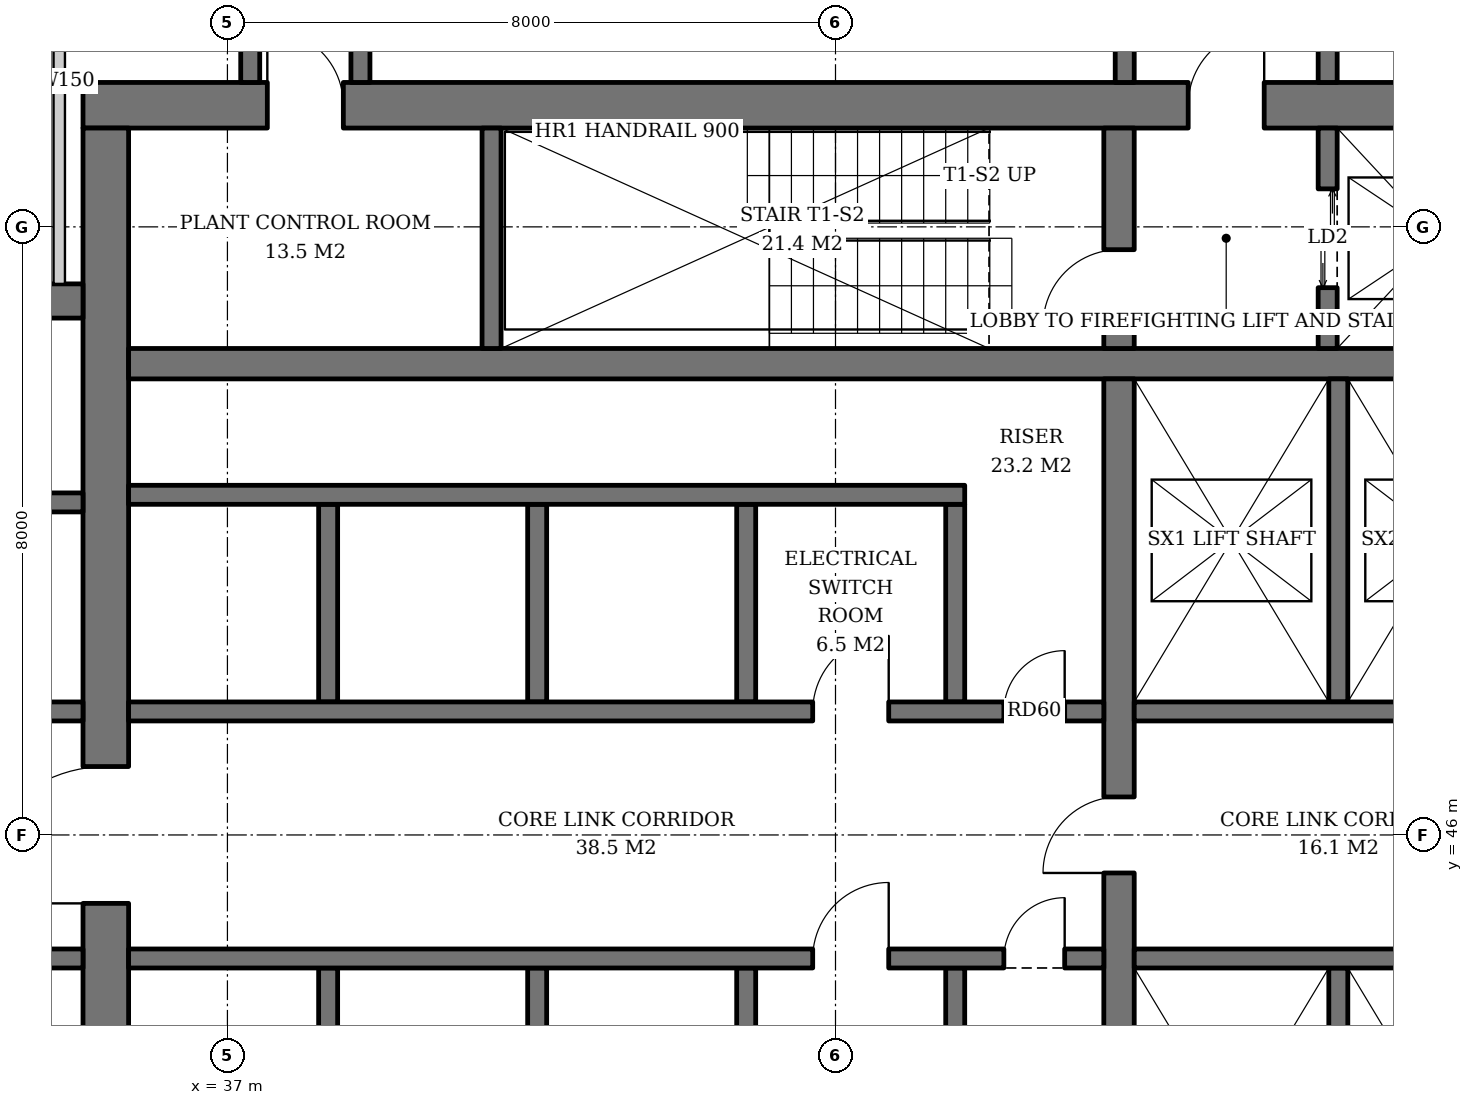
"""IFC4 building model, lengths in metres.
Left out: names, types, materials, properties, quantities, classifications, styles, units other than length and angle.
Written with IfcOpenShell. Run it as: python <this file> out.ifc"""

import sys

from ifc_helpers import new_model, si_unit, direction, frame, frame_2d, origin, place, context, subcontext, project, spatial, rectangle, extrude, element, fill, save


model = new_model("IFC4")
c1 = context("Model", 3, precision=1e-05, world=origin(), true_north=direction((0.0, 1.0)))
c2 = subcontext(c1, "Body", "Model", "MODEL_VIEW")
j1 = project(units=[si_unit("LENGTHUNIT", "METRE"), si_unit("PLANEANGLEUNIT", "RADIAN")], contexts=[c1])
p1 = place(None, origin())
s1 = spatial("IfcSite", under=j1, at=p1, CompositionType="ELEMENT")
p2 = place(p1, origin())
s2 = spatial("IfcBuilding", under=s1, at=p2, CompositionType="ELEMENT")
p3 = place(p2, frame((0.0, 0.0, 161.6)))
s3 = spatial("IfcBuildingStorey", under=s2, at=p3, CompositionType="ELEMENT", Elevation=161.6)
p4 = place(p3, frame((35.1, 55.6, 0.0), z_axis=(0.0, 0.0, 1.0), x_axis=(1.0, 0.0, 0.0)))
e1 = element("IfcWall", 1, at=p4, inside=s3, PredefinedType="SHEAR", context=c2, shape_type="SweptSolid", body=[
    extrude(rectangle(XDim=19.8, YDim=0.6, at=frame_2d((9.9, 0.0))), origin(), (0.0, 0.0, 1.0), 3.8),
])
p5 = place(p4, frame((14.54, 0.0, 0.0)))
e2 = element("IfcOpeningElement", 2, at=p5, cuts=e1, PredefinedType="OPENING", context=c2, shape_type="SweptSolid", body=[
    extrude(rectangle(XDim=1.0, YDim=2.1, at=frame_2d((0.5, 1.05))), frame((0.0, 0.31, 0.0), z_axis=(0.0, -1.0, 0.0), x_axis=(1.0, 0.0, 0.0)), (0.0, 0.0, 1.0), 0.62),
])
p6 = place(p4, frame((2.425, 0.0, 0.0)))
e3 = element("IfcOpeningElement", 3, at=p6, cuts=e1, PredefinedType="OPENING", context=c2, shape_type="SweptSolid", body=[
    extrude(rectangle(XDim=1.0, YDim=2.1, at=frame_2d((0.5, 1.05))), frame((0.0, 0.31, 0.0), z_axis=(0.0, -1.0, 0.0), x_axis=(1.0, 0.0, 0.0)), (0.0, 0.0, 1.0), 0.62),
])
p7 = place(p3, frame((35.4, 36.7, 0.0), z_axis=(0.0, 0.0, 1.0), x_axis=(0.0, 1.0, 0.0)))
e4 = element("IfcWall", 4, at=p7, inside=s3, PredefinedType="SHEAR", context=c2, shape_type="SweptSolid", body=[
    extrude(rectangle(XDim=18.6, YDim=0.6, at=frame_2d((9.3, 0.0))), origin(), (0.0, 0.0, 1.0), 3.8),
])
p8 = place(p7, frame((8.4, 0.0, 0.0)))
e5 = element("IfcOpeningElement", 5, at=p8, cuts=e4, PredefinedType="OPENING", context=c2, shape_type="SweptSolid", body=[
    extrude(rectangle(XDim=1.8, YDim=2.4, at=frame_2d((0.9, 1.2))), frame((0.0, 0.31, 0.0), z_axis=(0.0, -1.0, 0.0), x_axis=(1.0, 0.0, 0.0)), (0.0, 0.0, 1.0), 0.62),
])
p9 = place(p3, frame((35.7, 52.2, 0.0), z_axis=(0.0, 0.0, 1.0), x_axis=(1.0, 0.0, 0.0)))
e6 = element("IfcWall", 6, at=p9, inside=s3, PredefinedType="SHEAR", context=c2, shape_type="SweptSolid", body=[
    extrude(rectangle(XDim=18.6, YDim=0.4, at=frame_2d((9.3, 0.0))), origin(), (0.0, 0.0, 1.0), 3.8),
])
p10 = place(p3, frame((48.73, 40.0, 0.0), z_axis=(0.0, 0.0, 1.0), x_axis=(0.0, 1.0, 0.0)))
e7 = element("IfcWall", 7, at=p10, inside=s3, PredefinedType="SHEAR", context=c2, shape_type="SweptSolid", body=[
    extrude(rectangle(XDim=12.0, YDim=0.4, at=frame_2d((6.0, 0.0))), origin(), (0.0, 0.0, 1.0), 3.8),
])
p11 = place(p10, frame((5.5, 0.0, 0.0)))
e8 = element("IfcOpeningElement", 8, at=p11, cuts=e7, PredefinedType="OPENING", context=c2, shape_type="SweptSolid", body=[
    extrude(rectangle(XDim=1.0, YDim=2.1, at=frame_2d((0.5, 1.05))), frame((0.0, 0.21, 0.0), z_axis=(0.0, -1.0, 0.0), x_axis=(1.0, 0.0, 0.0)), (0.0, 0.0, 1.0), 0.42),
])
p12 = place(p3, frame((48.73, 52.4, 0.0), z_axis=(0.0, 0.0, 1.0), x_axis=(0.0, 1.0, 0.0)))
e9 = element("IfcWall", 9, at=p12, inside=s3, PredefinedType="SHEAR", context=c2, shape_type="SweptSolid", body=[
    extrude(rectangle(XDim=2.9, YDim=0.4, at=frame_2d((1.45, 0.0))), origin(), (0.0, 0.0, 1.0), 3.8),
])
p13 = place(p12, frame((0.3, 0.0, 0.0)))
e10 = element("IfcOpeningElement", 10, at=p13, cuts=e9, PredefinedType="OPENING", context=c2, shape_type="SweptSolid", body=[
    extrude(rectangle(XDim=1.0, YDim=2.1, at=frame_2d((0.5, 1.05))), frame((0.0, 0.21, 0.0), z_axis=(0.0, -1.0, 0.0), x_axis=(1.0, 0.0, 0.0)), (0.0, 0.0, 1.0), 0.42),
])
p14 = place(p3, frame((40.475, 52.4, 0.0), z_axis=(0.0, 0.0, 1.0), x_axis=(0.0, 1.0, 0.0)))
e11 = element("IfcWall", 11, at=p14, inside=s3, PredefinedType="SHEAR", context=c2, shape_type="SweptSolid", body=[
    extrude(rectangle(XDim=2.9, YDim=0.25, at=frame_2d((1.45, 0.0))), origin(), (0.0, 0.0, 1.0), 3.8),
])
p15 = place(p3, frame((51.475, 52.4, 0.0), z_axis=(0.0, 0.0, 1.0), x_axis=(0.0, 1.0, 0.0)))
e12 = element("IfcWall", 12, at=p15, inside=s3, PredefinedType="SHEAR", context=c2, shape_type="SweptSolid", body=[
    extrude(rectangle(XDim=2.9, YDim=0.25, at=frame_2d((1.45, 0.0))), origin(), (0.0, 0.0, 1.0), 3.8),
])
p16 = place(p15, frame((0.8, 0.0, 0.0)))
e13 = element("IfcOpeningElement", 13, at=p16, cuts=e12, PredefinedType="OPENING", context=c2, shape_type="SweptSolid", body=[
    extrude(rectangle(XDim=1.3, YDim=2.2, at=frame_2d((0.65, 1.1))), frame((0.0, 0.135, 0.0), z_axis=(0.0, -1.0, 0.0), x_axis=(1.0, 0.0, 0.0)), (0.0, 0.0, 1.0), 0.27),
])
for number, where, z_axis, x_axis in (
    (14, (38.325, 47.75, 0.0), (0.0, 0.0, 1.0), (0.0, 1.0, 0.0)),
    (15, (41.075, 47.75, 0.0), (0.0, 0.0, 1.0), (0.0, 1.0, 0.0)),
    (16, (43.825, 47.75, 0.0), (0.0, 0.0, 1.0), (0.0, 1.0, 0.0)),
    (17, (46.575, 47.75, 0.0), (0.0, 0.0, 1.0), (0.0, 1.0, 0.0)),
):
    element("IfcWall", number, at=place(p3, frame(where, z_axis=z_axis, x_axis=x_axis)), inside=s3, PredefinedType="SHEAR", context=c2, shape_type="SweptSolid", body=[
        extrude(rectangle(XDim=2.6, YDim=0.25, at=frame_2d((1.3, 0.0))), origin(), (0.0, 0.0, 1.0), 3.8),
    ])
p17 = place(p3, frame((35.7, 50.475, 0.0), z_axis=(0.0, 0.0, 1.0), x_axis=(1.0, 0.0, 0.0)))
e18 = element("IfcWall", 18, at=p17, inside=s3, PredefinedType="SHEAR", context=c2, shape_type="SweptSolid", body=[
    extrude(rectangle(XDim=11.0, YDim=0.25, at=frame_2d((5.5, 0.0))), origin(), (0.0, 0.0, 1.0), 3.8),
])
p18 = place(p3, frame((35.7, 47.625, 0.0), z_axis=(0.0, 0.0, 1.0), x_axis=(1.0, 0.0, 0.0)))
e19 = element("IfcWall", 19, at=p18, inside=s3, PredefinedType="SHEAR", context=c2, shape_type="SweptSolid", body=[
    extrude(rectangle(XDim=12.83, YDim=0.25, at=frame_2d((6.415, 0.0))), origin(), (0.0, 0.0, 1.0), 3.8),
])
p19 = place(p18, frame((9.0, 0.0, 0.0)))
e20 = element("IfcOpeningElement", 20, at=p19, cuts=e19, PredefinedType="OPENING", context=c2, shape_type="SweptSolid", body=[
    extrude(rectangle(XDim=1.0, YDim=2.1, at=frame_2d((0.5, 1.05))), frame((0.0, 0.135, 0.0), z_axis=(0.0, -1.0, 0.0), x_axis=(1.0, 0.0, 0.0)), (0.0, 0.0, 1.0), 0.27),
])
p20 = place(p18, frame((11.515, 0.0, 0.0)))
e21 = element("IfcOpeningElement", 21, at=p20, cuts=e19, PredefinedType="OPENING", context=c2, shape_type="SweptSolid", body=[
    extrude(rectangle(XDim=0.8, YDim=2.0, at=frame_2d((0.4, 1.0))), frame((0.0, 0.135, 0.0), z_axis=(0.0, -1.0, 0.0), x_axis=(1.0, 0.0, 0.0)), (0.0, 0.0, 1.0), 0.27),
])
for number, where, z_axis, x_axis in (
    (22, (38.325, 44.25, 0.0), (0.0, 0.0, 1.0), (0.0, -1.0, 0.0)),
    (23, (41.075, 44.25, 0.0), (0.0, 0.0, 1.0), (0.0, -1.0, 0.0)),
    (24, (43.825, 44.25, 0.0), (0.0, 0.0, 1.0), (0.0, -1.0, 0.0)),
    (25, (46.575, 44.25, 0.0), (0.0, 0.0, 1.0), (0.0, -1.0, 0.0)),
):
    element("IfcWall", number, at=place(p3, frame(where, z_axis=z_axis, x_axis=x_axis)), inside=s3, PredefinedType="SHEAR", context=c2, shape_type="SweptSolid", body=[
        extrude(rectangle(XDim=2.6, YDim=0.25, at=frame_2d((1.3, 0.0))), origin(), (0.0, 0.0, 1.0), 3.8),
    ])
p21 = place(p3, frame((35.7, 44.375, 0.0), z_axis=(0.0, 0.0, 1.0), x_axis=(1.0, 0.0, 0.0)))
e26 = element("IfcWall", 26, at=p21, inside=s3, PredefinedType="SHEAR", context=c2, shape_type="SweptSolid", body=[
    extrude(rectangle(XDim=12.83, YDim=0.25, at=frame_2d((6.415, 0.0))), origin(), (0.0, 0.0, 1.0), 3.8),
])
p22 = place(p21, frame((9.0, 0.0, 0.0)))
e27 = element("IfcOpeningElement", 27, at=p22, cuts=e26, PredefinedType="OPENING", context=c2, shape_type="SweptSolid", body=[
    extrude(rectangle(XDim=1.0, YDim=2.1, at=frame_2d((0.5, 1.05))), frame((0.0, 0.135, 0.0), z_axis=(0.0, -1.0, 0.0), x_axis=(1.0, 0.0, 0.0)), (0.0, 0.0, 1.0), 0.27),
])
p23 = place(p21, frame((11.515, 0.0, 0.0)))
e28 = element("IfcOpeningElement", 28, at=p23, cuts=e26, PredefinedType="OPENING", context=c2, shape_type="SweptSolid", body=[
    extrude(rectangle(XDim=0.8, YDim=2.0, at=frame_2d((0.4, 1.0))), frame((0.0, 0.135, 0.0), z_axis=(0.0, -1.0, 0.0), x_axis=(1.0, 0.0, 0.0)), (0.0, 0.0, 1.0), 0.27),
])
p24 = place(p3, frame((51.615, 47.75, 0.0), z_axis=(0.0, 0.0, 1.0), x_axis=(0.0, 1.0, 0.0)))
e29 = element("IfcWall", 29, at=p24, inside=s3, PredefinedType="SHEAR", context=c2, shape_type="SweptSolid", body=[
    extrude(rectangle(XDim=4.25, YDim=0.25, at=frame_2d((2.125, 0.0))), origin(), (0.0, 0.0, 1.0), 3.8),
])
p25 = place(p3, frame((48.93, 47.625, 0.0), z_axis=(0.0, 0.0, 1.0), x_axis=(1.0, 0.0, 0.0)))
e30 = element("IfcWall", 30, at=p25, inside=s3, PredefinedType="SHEAR", context=c2, shape_type="SweptSolid", body=[
    extrude(rectangle(XDim=5.37, YDim=0.25, at=frame_2d((2.685, 0.0))), origin(), (0.0, 0.0, 1.0), 3.8),
])
p26 = place(p3, frame((51.615, 44.25, 0.0), z_axis=(0.0, 0.0, 1.0), x_axis=(0.0, -1.0, 0.0)))
e31 = element("IfcWall", 31, at=p26, inside=s3, PredefinedType="SHEAR", context=c2, shape_type="SweptSolid", body=[
    extrude(rectangle(XDim=4.25, YDim=0.25, at=frame_2d((2.125, 0.0))), origin(), (0.0, 0.0, 1.0), 3.8),
])
p27 = place(p3, frame((48.93, 44.375, 0.0), z_axis=(0.0, 0.0, 1.0), x_axis=(1.0, 0.0, 0.0)))
e32 = element("IfcWall", 32, at=p27, inside=s3, PredefinedType="SHEAR", context=c2, shape_type="SweptSolid", body=[
    extrude(rectangle(XDim=5.37, YDim=0.25, at=frame_2d((2.685, 0.0))), origin(), (0.0, 0.0, 1.0), 3.8),
])
for number, where, z_axis, x_axis in (
    (33, (32.4, 44.375, 0.0), (0.0, 0.0, 1.0), (1.0, 0.0, 0.0)),
    (34, (32.4, 47.625, 0.0), (0.0, 0.0, 1.0), (1.0, 0.0, 0.0)),
    (35, (32.4, 50.375, 0.0), (0.0, 0.0, 1.0), (1.0, 0.0, 0.0)),
):
    element("IfcWall", number, at=place(p3, frame(where, z_axis=z_axis, x_axis=x_axis)), inside=s3, PredefinedType="SHEAR", context=c2, shape_type="SweptSolid", body=[
        extrude(rectangle(XDim=2.7, YDim=0.25, at=frame_2d((1.35, 0.0))), origin(), (0.0, 0.0, 1.0), 3.8),
    ])
p28 = place(p3, frame((32.4, 53.025, 0.0), z_axis=(0.0, 0.0, 1.0), x_axis=(1.0, 0.0, 0.0)))
e36 = element("IfcWall", 36, at=p28, inside=s3, PredefinedType="SHEAR", context=c2, shape_type="SweptSolid", body=[
    extrude(rectangle(XDim=2.7, YDim=0.45, at=frame_2d((1.35, 0.0))), origin(), (0.0, 0.0, 1.0), 3.8),
])
p29 = place(p3, frame((48.805, 55.9, 0.0), z_axis=(0.0, 0.0, 1.0), x_axis=(0.0, 1.0, 0.0)))
e37 = element("IfcWall", 37, at=p29, inside=s3, PredefinedType="SOLIDWALL", context=c2, shape_type="SweptSolid", body=[
    extrude(rectangle(XDim=2.7, YDim=0.25, at=frame_2d((1.35, 0.0))), origin(), (0.0, 0.0, 1.0), 3.2),
])
p30 = place(p29, frame((0.85, 0.0, 0.0)))
e38 = element("IfcOpeningElement", 38, at=p30, cuts=e37, PredefinedType="OPENING", context=c2, shape_type="SweptSolid", body=[
    extrude(rectangle(XDim=1.0, YDim=2.1, at=frame_2d((0.5, 1.05))), frame((0.0, 0.135, 0.0), z_axis=(0.0, -1.0, 0.0), x_axis=(1.0, 0.0, 0.0)), (0.0, 0.0, 1.0), 0.27),
])
p31 = place(p3, frame((51.475, 55.9, 0.0), z_axis=(0.0, 0.0, 1.0), x_axis=(0.0, 1.0, 0.0)))
e39 = element("IfcWall", 39, at=p31, inside=s3, PredefinedType="SOLIDWALL", context=c2, shape_type="SweptSolid", body=[
    extrude(rectangle(XDim=2.7, YDim=0.25, at=frame_2d((1.35, 0.0))), origin(), (0.0, 0.0, 1.0), 3.2),
])
p32 = place(p31, frame((0.85, 0.0, 0.0)))
e40 = element("IfcOpeningElement", 40, at=p32, cuts=e39, PredefinedType="OPENING", context=c2, shape_type="SweptSolid", body=[
    extrude(rectangle(XDim=1.0, YDim=2.1, at=frame_2d((0.5, 1.05))), frame((0.0, 0.135, 0.0), z_axis=(0.0, -1.0, 0.0), x_axis=(1.0, 0.0, 0.0)), (0.0, 0.0, 1.0), 0.27),
])
p33 = place(p3, frame((37.3, 55.9, 0.0), z_axis=(0.0, 0.0, 1.0), x_axis=(0.0, 1.0, 0.0)))
e41 = element("IfcWall", 41, at=p33, inside=s3, PredefinedType="SOLIDWALL", context=c2, shape_type="SweptSolid", body=[
    extrude(rectangle(XDim=2.7, YDim=0.25, at=frame_2d((1.35, 0.0))), origin(), (0.0, 0.0, 1.0), 3.2),
])
p34 = place(p3, frame((38.75, 55.9, 0.0), z_axis=(0.0, 0.0, 1.0), x_axis=(0.0, 1.0, 0.0)))
e42 = element("IfcWall", 42, at=p34, inside=s3, PredefinedType="SOLIDWALL", context=c2, shape_type="SweptSolid", body=[
    extrude(rectangle(XDim=2.7, YDim=0.25, at=frame_2d((1.35, 0.0))), origin(), (0.0, 0.0, 1.0), 3.2),
])
p35 = place(p34, frame((0.85, 0.0, 0.0)))
e43 = element("IfcOpeningElement", 43, at=p35, cuts=e42, PredefinedType="OPENING", context=c2, shape_type="SweptSolid", body=[
    extrude(rectangle(XDim=1.0, YDim=2.1, at=frame_2d((0.5, 1.05))), frame((0.0, 0.135, 0.0), z_axis=(0.0, -1.0, 0.0), x_axis=(1.0, 0.0, 0.0)), (0.0, 0.0, 1.0), 0.27),
])
p36 = place(p3, frame((34.788, 53.25, 0.0), z_axis=(0.0, 0.0, 1.0), x_axis=(0.0, 1.0, 0.0)))
e44 = element("IfcWall", 44, at=p36, inside=s3, PredefinedType="SOLIDWALL", context=c2, shape_type="SweptSolid", body=[
    extrude(rectangle(XDim=5.35, YDim=0.15, at=frame_2d((2.675, 0.0))), origin(), (0.0, 0.0, 1.0), 3.2),
])
p37 = place(p16, origin())
e45 = element("IfcDoor", 45, at=p37, inside=s3, OperationType="DOUBLE_DOOR_SLIDING", PredefinedType="DOOR", context=c2, shape_type="SweptSolid", body=[
    extrude(rectangle(XDim=1.3, YDim=2.2, at=frame_2d((0.65, 1.1))), frame((0.0, 0.025, 0.0), z_axis=(0.0, -1.0, 0.0), x_axis=(1.0, 0.0, 0.0)), (0.0, 0.0, 1.0), 0.05),
])
fill(e13, e45)
p38 = place(p19, origin())
e46 = element("IfcDoor", 46, at=p38, inside=s3, OperationType="SINGLE_SWING_RIGHT", PredefinedType="DOOR", context=c2, shape_type="SweptSolid", body=[
    extrude(rectangle(XDim=1.0, YDim=2.1, at=frame_2d((0.5, 1.05))), frame((0.0, 0.025, 0.0), z_axis=(0.0, -1.0, 0.0), x_axis=(1.0, 0.0, 0.0)), (0.0, 0.0, 1.0), 0.05),
])
fill(e20, e46)
p39 = place(p20, origin())
e47 = element("IfcDoor", 47, at=p39, inside=s3, OperationType="SINGLE_SWING_RIGHT", PredefinedType="DOOR", context=c2, shape_type="SweptSolid", body=[
    extrude(rectangle(XDim=0.8, YDim=2.0, at=frame_2d((0.4, 1.0))), frame((0.0, 0.025, 0.0), z_axis=(0.0, -1.0, 0.0), x_axis=(1.0, 0.0, 0.0)), (0.0, 0.0, 1.0), 0.05),
])
fill(e21, e47)
p40 = place(p22, origin())
e48 = element("IfcDoor", 48, at=p40, inside=s3, OperationType="SINGLE_SWING_RIGHT", PredefinedType="DOOR", context=c2, shape_type="SweptSolid", body=[
    extrude(rectangle(XDim=1.0, YDim=2.1, at=frame_2d((0.5, 1.05))), frame((0.0, 0.025, 0.0), z_axis=(0.0, -1.0, 0.0), x_axis=(1.0, 0.0, 0.0)), (0.0, 0.0, 1.0), 0.05),
])
fill(e27, e48)
p41 = place(p23, origin())
e49 = element("IfcDoor", 49, at=p41, inside=s3, OperationType="SINGLE_SWING_RIGHT", PredefinedType="DOOR", context=c2, shape_type="SweptSolid", body=[
    extrude(rectangle(XDim=0.8, YDim=2.0, at=frame_2d((0.4, 1.0))), frame((0.0, 0.025, 0.0), z_axis=(0.0, -1.0, 0.0), x_axis=(1.0, 0.0, 0.0)), (0.0, 0.0, 1.0), 0.05),
])
fill(e28, e49)
p42 = place(p11, origin())
e50 = element("IfcDoor", 50, at=p42, inside=s3, OperationType="SINGLE_SWING_LEFT", PredefinedType="DOOR", context=c2, shape_type="SweptSolid", body=[
    extrude(rectangle(XDim=1.0, YDim=2.1, at=frame_2d((0.5, 1.05))), frame((0.0, 0.025, 0.0), z_axis=(0.0, -1.0, 0.0), x_axis=(1.0, 0.0, 0.0)), (0.0, 0.0, 1.0), 0.05),
])
fill(e8, e50)
p43 = place(p13, origin())
e51 = element("IfcDoor", 51, at=p43, inside=s3, OperationType="SINGLE_SWING_LEFT", PredefinedType="DOOR", context=c2, shape_type="SweptSolid", body=[
    extrude(rectangle(XDim=1.0, YDim=2.1, at=frame_2d((0.5, 1.05))), frame((0.0, 0.025, 0.0), z_axis=(0.0, -1.0, 0.0), x_axis=(1.0, 0.0, 0.0)), (0.0, 0.0, 1.0), 0.05),
])
fill(e10, e51)
p44 = place(p5, origin())
e52 = element("IfcDoor", 52, at=p44, inside=s3, OperationType="SINGLE_SWING_RIGHT", PredefinedType="DOOR", context=c2, shape_type="SweptSolid", body=[
    extrude(rectangle(XDim=1.0, YDim=2.1, at=frame_2d((0.5, 1.05))), frame((0.0, 0.025, 0.0), z_axis=(0.0, -1.0, 0.0), x_axis=(1.0, 0.0, 0.0)), (0.0, 0.0, 1.0), 0.05),
])
fill(e2, e52)
p45 = place(p8, origin())
e53 = element("IfcDoor", 53, at=p45, inside=s3, OperationType="DOUBLE_DOOR_SINGLE_SWING", PredefinedType="DOOR", context=c2, shape_type="SweptSolid", body=[
    extrude(rectangle(XDim=1.8, YDim=2.4, at=frame_2d((0.9, 1.2))), frame((0.0, 0.025, 0.0), z_axis=(0.0, -1.0, 0.0), x_axis=(1.0, 0.0, 0.0)), (0.0, 0.0, 1.0), 0.05),
])
fill(e5, e53)
p46 = place(p6, origin())
e54 = element("IfcDoor", 54, at=p46, inside=s3, OperationType="SINGLE_SWING_LEFT", PredefinedType="DOOR", context=c2, shape_type="SweptSolid", body=[
    extrude(rectangle(XDim=1.0, YDim=2.1, at=frame_2d((0.5, 1.05))), frame((0.0, -0.24, 0.0), z_axis=(0.0, -1.0, 0.0), x_axis=(1.0, 0.0, 0.0)), (0.0, 0.0, 1.0), 0.05),
])
fill(e3, e54)
save(model, sys.argv[1])
